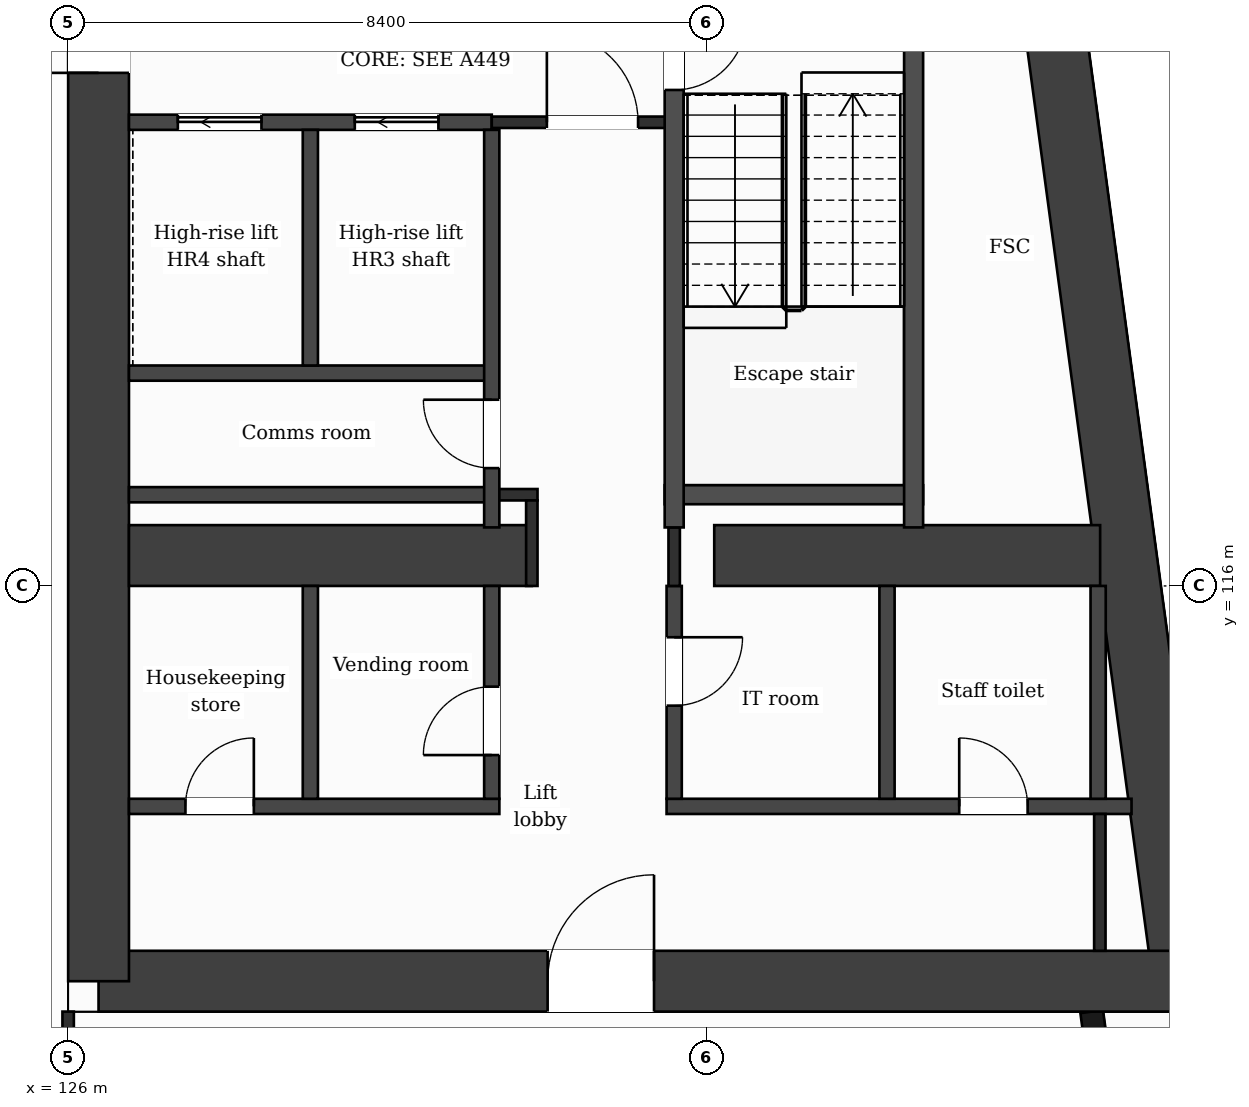
"""IFC4 building model, lengths in metres.
Left out: names, types, materials, properties, quantities, classifications, styles, units other than length and angle.
Written with IfcOpenShell. Run it as: python <this file> out.ifc"""

import sys

from ifc_helpers import new_model, si_unit, direction, frame, frame_2d, origin, place, context, subcontext, project, spatial, rectangle, extrude, element, fill, save


model = new_model("IFC4")
c1 = context("Model", 3, precision=1e-05, world=origin(), true_north=direction((0.0, 1.0)))
c2 = subcontext(c1, "Body", "Model", "MODEL_VIEW")
j1 = project(units=[si_unit("LENGTHUNIT", "METRE"), si_unit("PLANEANGLEUNIT", "RADIAN")], contexts=[c1])
p1 = place(None, origin())
s1 = spatial("IfcSite", under=j1, at=p1, CompositionType="ELEMENT")
p2 = place(p1, origin())
s2 = spatial("IfcBuilding", under=s1, at=p2, CompositionType="ELEMENT")
p3 = place(p2, frame((0.0, 0.0, 202.2)))
s3 = spatial("IfcBuildingStorey", under=s2, at=p3, CompositionType="ELEMENT", Elevation=202.2)
p4 = place(p3, frame((137.82, 132.0, 0.0), z_axis=(0.0, 0.0, 1.0), x_axis=(0.133408347329, -0.991061154956, 0.0)))
e1 = element("IfcWall", 1, at=p4, inside=s3, PredefinedType="SHEAR", context=c2, shape_type="SweptSolid", body=[
    extrude(rectangle(XDim=21.391, YDim=0.8, at=frame_2d((10.696, 0.0))), origin(), (0.0, 0.0, 1.0), 3.7),
])
p5 = place(p3, frame((140.673, 110.8, 0.0), z_axis=(0.0, 0.0, 1.0), x_axis=(-1.0, 0.0, 0.0)))
e2 = element("IfcWall", 2, at=p5, inside=s3, PredefinedType="SHEAR", context=c2, shape_type="SweptSolid", body=[
    extrude(rectangle(XDim=14.273, YDim=0.8, at=frame_2d((7.137, 0.0))), origin(), (0.0, 0.0, 1.0), 3.7),
])
p6 = place(p5, frame((6.965, 0.0, 0.0)))
e3 = element("IfcOpeningElement", 3, at=p6, cuts=e2, PredefinedType="OPENING", context=c2, shape_type="SweptSolid", body=[
    extrude(rectangle(XDim=1.4, YDim=2.1, at=frame_2d((0.7, 1.05))), frame((0.0, 0.41, 0.0), z_axis=(0.0, -1.0, 0.0), x_axis=(1.0, 0.0, 0.0)), (0.0, 0.0, 1.0), 0.82),
])
p7 = place(p3, frame((126.4, 110.8, 0.0), z_axis=(0.0, 0.0, 1.0), x_axis=(0.0, 1.0, 0.0)))
e4 = element("IfcWall", 4, at=p7, inside=s3, PredefinedType="SHEAR", context=c2, shape_type="SweptSolid", body=[
    extrude(rectangle(XDim=21.2, YDim=0.8, at=frame_2d((10.6, 0.0))), origin(), (0.0, 0.0, 1.0), 3.7),
])
p8 = place(p7, frame((11.95, 0.0, 0.0)))
e5 = element("IfcOpeningElement", 5, at=p8, cuts=e4, PredefinedType="OPENING", context=c2, shape_type="SweptSolid", body=[
    extrude(rectangle(XDim=1.4, YDim=2.1, at=frame_2d((0.7, 1.05))), frame((0.0, 0.41, 0.0), z_axis=(0.0, -1.0, 0.0), x_axis=(1.0, 0.0, 0.0)), (0.0, 0.0, 1.0), 0.82),
])
p9 = place(p3, frame((126.8, 116.4, 0.0), z_axis=(0.0, 0.0, 1.0), x_axis=(1.0, 0.0, 0.0)))
e6 = element("IfcWall", 6, at=p9, inside=s3, PredefinedType="SHEAR", context=c2, shape_type="SweptSolid", body=[
    extrude(rectangle(XDim=5.3, YDim=0.8, at=frame_2d((2.65, 0.0))), origin(), (0.0, 0.0, 1.0), 3.7),
])
p10 = place(p3, frame((134.5, 116.4, 0.0), z_axis=(0.0, 0.0, 1.0), x_axis=(1.0, 0.0, 0.0)))
e7 = element("IfcWall", 7, at=p10, inside=s3, PredefinedType="SHEAR", context=c2, shape_type="SweptSolid", body=[
    extrude(rectangle(XDim=5.077, YDim=0.8, at=frame_2d((2.539, 0.0))), origin(), (0.0, 0.0, 1.0), 3.7),
])
p11 = place(p3, frame((140.348, 103.85, 0.0), z_axis=(0.0, 0.0, 1.0), x_axis=(-0.133431549479, 0.991058031401, 0.0)))
e8 = element("IfcWall", 8, at=p11, inside=s3, PredefinedType="SOLIDWALL", context=c2, shape_type="SweptSolid", body=[
    extrude(rectangle(XDim=6.609, YDim=0.3, at=frame_2d((3.304, 0.0))), origin(), (0.0, 0.0, 1.0), 3.38),
])
p12 = place(p11, frame((0.737, 0.0, 0.9)))
e9 = element("IfcOpeningElement", 9, at=p12, cuts=e8, PredefinedType="OPENING", context=c2, shape_type="SweptSolid", body=[
    extrude(rectangle(XDim=1.2, YDim=2.1, at=frame_2d((0.6, 1.05))), frame((0.0, 0.16, 0.0), z_axis=(0.0, -1.0, 0.0), x_axis=(1.0, 0.0, 0.0)), (0.0, 0.0, 1.0), 0.32),
])
p13 = place(p11, frame((3.991, 0.0, 0.0)))
e10 = element("IfcOpeningElement", 10, at=p13, cuts=e8, PredefinedType="OPENING", context=c2, shape_type="SweptSolid", body=[
    extrude(rectangle(XDim=1.2, YDim=2.4, at=frame_2d((0.6, 1.2))), frame((0.0, 0.16, 0.0), z_axis=(0.0, -1.0, 0.0), x_axis=(1.0, 0.0, 0.0)), (0.0, 0.0, 1.0), 0.32),
])
p14 = place(p3, frame((126.8, 113.1, 0.0), z_axis=(0.0, 0.0, 1.0), x_axis=(1.0, 0.0, 0.0)))
e11 = element("IfcWall", 11, at=p14, inside=s3, PredefinedType="PARTITIONING", context=c2, shape_type="SweptSolid", body=[
    extrude(rectangle(XDim=4.873, YDim=0.2, at=frame_2d((2.437, 0.0))), origin(), (0.0, 0.0, 1.0), 3.38),
])
p15 = place(p14, frame((0.743, 0.0, 0.0)))
e12 = element("IfcOpeningElement", 12, at=p15, cuts=e11, PredefinedType="OPENING", context=c2, shape_type="SweptSolid", body=[
    extrude(rectangle(XDim=0.9, YDim=2.1, at=frame_2d((0.45, 1.05))), frame((0.0, 0.11, 0.0), z_axis=(0.0, -1.0, 0.0), x_axis=(1.0, 0.0, 0.0)), (0.0, 0.0, 1.0), 0.22),
])
p16 = place(p3, frame((133.873, 113.1, 0.0), z_axis=(0.0, 0.0, 1.0), x_axis=(1.0, 0.0, 0.0)))
e13 = element("IfcWall", 13, at=p16, inside=s3, PredefinedType="PARTITIONING", context=c2, shape_type="SweptSolid", body=[
    extrude(rectangle(XDim=6.117, YDim=0.2, at=frame_2d((3.059, 0.0))), origin(), (0.0, 0.0, 1.0), 3.38),
])
p17 = place(p16, frame((3.85, 0.0, 0.0)))
e14 = element("IfcOpeningElement", 14, at=p17, cuts=e13, PredefinedType="OPENING", context=c2, shape_type="SweptSolid", body=[
    extrude(rectangle(XDim=0.9, YDim=2.1, at=frame_2d((0.45, 1.05))), frame((0.0, 0.11, 0.0), z_axis=(0.0, -1.0, 0.0), x_axis=(1.0, 0.0, 0.0)), (0.0, 0.0, 1.0), 0.22),
])
p18 = place(p3, frame((126.8, 117.2, 0.0), z_axis=(0.0, 0.0, 1.0), x_axis=(1.0, 0.0, 0.0)))
e15 = element("IfcWall", 15, at=p18, inside=s3, PredefinedType="PARTITIONING", context=c2, shape_type="SweptSolid", body=[
    extrude(rectangle(XDim=4.773, YDim=0.2, at=frame_2d((2.386, 0.0))), origin(), (0.0, 0.0, 1.0), 3.38),
])
p19 = place(p3, frame((131.573, 117.2, 0.0), z_axis=(0.0, 0.0, 1.0), x_axis=(1.0, 0.0, 0.0)))
e16 = element("IfcWall", 16, at=p19, inside=s3, PredefinedType="PARTITIONING", context=c2, shape_type="SweptSolid", body=[
    extrude(rectangle(XDim=0.602, YDim=0.15, at=frame_2d((0.301, 0.0))), origin(), (0.0, 0.0, 1.0), 3.38),
])
p20 = place(p3, frame((133.848, 117.2, 0.0), z_axis=(0.0, 0.0, 1.0), x_axis=(1.0, 0.0, 0.0)))
e17 = element("IfcWall", 17, at=p20, inside=s3, PredefinedType="PARTITIONING", context=c2, shape_type="SweptSolid", body=[
    extrude(rectangle(XDim=3.4, YDim=0.25, at=frame_2d((1.7, 0.0))), origin(), (0.0, 0.0, 1.0), 3.38),
])
p21 = place(p3, frame((126.8, 118.8, 0.0), z_axis=(0.0, 0.0, 1.0), x_axis=(1.0, 0.0, 0.0)))
e18 = element("IfcWall", 18, at=p21, inside=s3, PredefinedType="PARTITIONING", context=c2, shape_type="SweptSolid", body=[
    extrude(rectangle(XDim=4.773, YDim=0.2, at=frame_2d((2.386, 0.0))), origin(), (0.0, 0.0, 1.0), 3.38),
])
p22 = place(p3, frame((126.8, 122.1, 0.0), z_axis=(0.0, 0.0, 1.0), x_axis=(1.0, 0.0, 0.0)))
e19 = element("IfcWall", 19, at=p22, inside=s3, PredefinedType="PARTITIONING", context=c2, shape_type="SweptSolid", body=[
    extrude(rectangle(XDim=4.773, YDim=0.2, at=frame_2d((2.386, 0.0))), origin(), (0.0, 0.0, 1.0), 3.38),
])
p23 = place(p22, frame((2.971, 0.0, 0.0)))
e20 = element("IfcOpeningElement", 20, at=p23, cuts=e19, PredefinedType="OPENING", context=c2, shape_type="SweptSolid", body=[
    extrude(rectangle(XDim=1.1, YDim=2.1, at=frame_2d((0.55, 1.05))), frame((0.0, 0.11, 0.0), z_axis=(0.0, -1.0, 0.0), x_axis=(1.0, 0.0, 0.0)), (0.0, 0.0, 1.0), 0.22),
])
p24 = place(p22, frame((0.643, 0.0, 0.0)))
e21 = element("IfcOpeningElement", 21, at=p24, cuts=e19, PredefinedType="OPENING", context=c2, shape_type="SweptSolid", body=[
    extrude(rectangle(XDim=1.1, YDim=2.1, at=frame_2d((0.55, 1.05))), frame((0.0, 0.11, 0.0), z_axis=(0.0, -1.0, 0.0), x_axis=(1.0, 0.0, 0.0)), (0.0, 0.0, 1.0), 0.22),
])
p25 = place(p3, frame((131.573, 122.1, 0.0), z_axis=(0.0, 0.0, 1.0), x_axis=(1.0, 0.0, 0.0)))
e22 = element("IfcWall", 22, at=p25, inside=s3, PredefinedType="PARTITIONING", context=c2, shape_type="SweptSolid", body=[
    extrude(rectangle(XDim=2.4, YDim=0.15, at=frame_2d((1.2, 0.0))), origin(), (0.0, 0.0, 1.0), 3.38),
])
p26 = place(p25, frame((0.725, 0.0, 0.0)))
e23 = element("IfcOpeningElement", 23, at=p26, cuts=e22, PredefinedType="OPENING", context=c2, shape_type="SweptSolid", body=[
    extrude(rectangle(XDim=1.2, YDim=2.1, at=frame_2d((0.6, 1.05))), frame((0.0, 0.085, 0.0), z_axis=(0.0, -1.0, 0.0), x_axis=(1.0, 0.0, 0.0)), (0.0, 0.0, 1.0), 0.17),
])
p27 = place(p3, frame((126.0, 109.075, 0.0), z_axis=(0.0, 0.0, 1.0), x_axis=(0.0, 1.0, 0.0)))
e24 = element("IfcWall", 24, at=p27, inside=s3, PredefinedType="PARTITIONING", context=c2, shape_type="SweptSolid", body=[
    extrude(rectangle(XDim=1.325, YDim=0.15, at=frame_2d((0.663, 0.0))), origin(), (0.0, 0.0, 1.0), 3.38),
])
p28 = place(p3, frame((129.187, 113.2, 0.0), z_axis=(0.0, 0.0, 1.0), x_axis=(0.0, 1.0, 0.0)))
e25 = element("IfcWall", 25, at=p28, inside=s3, PredefinedType="PARTITIONING", context=c2, shape_type="SweptSolid", body=[
    extrude(rectangle(XDim=2.8, YDim=0.2, at=frame_2d((1.4, 0.0))), origin(), (0.0, 0.0, 1.0), 3.38),
])
p29 = place(p3, frame((129.187, 118.9, 0.0), z_axis=(0.0, 0.0, 1.0), x_axis=(0.0, 1.0, 0.0)))
e26 = element("IfcWall", 26, at=p29, inside=s3, PredefinedType="PARTITIONING", context=c2, shape_type="SweptSolid", body=[
    extrude(rectangle(XDim=3.1, YDim=0.2, at=frame_2d((1.55, 0.0))), origin(), (0.0, 0.0, 1.0), 3.38),
])
p30 = place(p3, frame((131.573, 113.2, 0.0), z_axis=(0.0, 0.0, 1.0), x_axis=(0.0, 1.0, 0.0)))
e27 = element("IfcWall", 27, at=p30, inside=s3, PredefinedType="PARTITIONING", context=c2, shape_type="SweptSolid", body=[
    extrude(rectangle(XDim=2.8, YDim=0.2, at=frame_2d((1.4, 0.0))), origin(), (0.0, 0.0, 1.0), 3.38),
])
p31 = place(p30, frame((0.575, 0.0, 0.0)))
e28 = element("IfcOpeningElement", 28, at=p31, cuts=e27, PredefinedType="OPENING", context=c2, shape_type="SweptSolid", body=[
    extrude(rectangle(XDim=0.9, YDim=2.1, at=frame_2d((0.45, 1.05))), frame((0.0, 0.11, 0.0), z_axis=(0.0, -1.0, 0.0), x_axis=(1.0, 0.0, 0.0)), (0.0, 0.0, 1.0), 0.22),
])
p32 = place(p3, frame((131.573, 116.77, 0.0), z_axis=(0.0, 0.0, 1.0), x_axis=(0.0, 1.0, 0.0)))
e29 = element("IfcWall", 29, at=p32, inside=s3, PredefinedType="PARTITIONING", context=c2, shape_type="SweptSolid", body=[
    extrude(rectangle(XDim=5.23, YDim=0.2, at=frame_2d((2.615, 0.0))), origin(), (0.0, 0.0, 1.0), 3.38),
])
p33 = place(p32, frame((0.78, 0.0, 0.0)))
e30 = element("IfcOpeningElement", 30, at=p33, cuts=e29, PredefinedType="OPENING", context=c2, shape_type="SweptSolid", body=[
    extrude(rectangle(XDim=0.9, YDim=2.1, at=frame_2d((0.45, 1.05))), frame((0.0, 0.11, 0.0), z_axis=(0.0, -1.0, 0.0), x_axis=(1.0, 0.0, 0.0)), (0.0, 0.0, 1.0), 0.22),
])
p34 = place(p3, frame((132.1, 116.0, 0.0), z_axis=(0.0, 0.0, 1.0), x_axis=(0.0, 1.0, 0.0)))
e31 = element("IfcWall", 31, at=p34, inside=s3, PredefinedType="PARTITIONING", context=c2, shape_type="SweptSolid", body=[
    extrude(rectangle(XDim=1.125, YDim=0.15, at=frame_2d((0.562, 0.0))), origin(), (0.0, 0.0, 1.0), 3.38),
])
p35 = place(p3, frame((133.973, 113.2, 0.0), z_axis=(0.0, 0.0, 1.0), x_axis=(0.0, 1.0, 0.0)))
e32 = element("IfcWall", 32, at=p35, inside=s3, PredefinedType="PARTITIONING", context=c2, shape_type="SweptSolid", body=[
    extrude(rectangle(XDim=2.8, YDim=0.2, at=frame_2d((1.4, 0.0))), origin(), (0.0, 0.0, 1.0), 3.38),
])
p36 = place(p35, frame((1.225, 0.0, 0.0)))
e33 = element("IfcOpeningElement", 33, at=p36, cuts=e32, PredefinedType="OPENING", context=c2, shape_type="SweptSolid", body=[
    extrude(rectangle(XDim=0.9, YDim=2.1, at=frame_2d((0.45, 1.05))), frame((0.0, 0.11, 0.0), z_axis=(0.0, -1.0, 0.0), x_axis=(1.0, 0.0, 0.0)), (0.0, 0.0, 1.0), 0.22),
])
p37 = place(p3, frame((133.973, 116.0, 0.0), z_axis=(0.0, 0.0, 1.0), x_axis=(0.0, 1.0, 0.0)))
e34 = element("IfcWall", 34, at=p37, inside=s3, PredefinedType="PARTITIONING", context=c2, shape_type="SweptSolid", body=[
    extrude(rectangle(XDim=0.77, YDim=0.15, at=frame_2d((0.385, 0.0))), origin(), (0.0, 0.0, 1.0), 3.38),
])
p38 = place(p3, frame((133.973, 116.77, 0.0), z_axis=(0.0, 0.0, 1.0), x_axis=(0.0, 1.0, 0.0)))
e35 = element("IfcWall", 35, at=p38, inside=s3, PredefinedType="PARTITIONING", context=c2, shape_type="SweptSolid", body=[
    extrude(rectangle(XDim=7.055, YDim=0.25, at=frame_2d((3.527, 0.0))), origin(), (0.0, 0.0, 1.0), 3.38),
])
p39 = place(p38, frame((5.755, 0.0, 0.0)))
e36 = element("IfcOpeningElement", 36, at=p39, cuts=e35, PredefinedType="OPENING", context=c2, shape_type="SweptSolid", body=[
    extrude(rectangle(XDim=0.95, YDim=2.1, at=frame_2d((0.475, 1.05))), frame((0.0, 0.135, 0.0), z_axis=(0.0, -1.0, 0.0), x_axis=(1.0, 0.0, 0.0)), (0.0, 0.0, 1.0), 0.27),
])
p40 = place(p3, frame((136.773, 113.2, 0.0), z_axis=(0.0, 0.0, 1.0), x_axis=(0.0, 1.0, 0.0)))
e37 = element("IfcWall", 37, at=p40, inside=s3, PredefinedType="PARTITIONING", context=c2, shape_type="SweptSolid", body=[
    extrude(rectangle(XDim=2.8, YDim=0.2, at=frame_2d((1.4, 0.0))), origin(), (0.0, 0.0, 1.0), 3.38),
])
p41 = place(p3, frame((137.123, 116.77, 0.0), z_axis=(0.0, 0.0, 1.0), x_axis=(0.0, 1.0, 0.0)))
e38 = element("IfcWall", 38, at=p41, inside=s3, PredefinedType="PARTITIONING", context=c2, shape_type="SweptSolid", body=[
    extrude(rectangle(XDim=7.055, YDim=0.25, at=frame_2d((3.527, 0.0))), origin(), (0.0, 0.0, 1.0), 3.38),
])
p42 = place(p3, frame((139.551, 113.2, 0.0), z_axis=(0.0, 0.0, 1.0), x_axis=(0.0, 1.0, 0.0)))
e39 = element("IfcWall", 39, at=p42, inside=s3, PredefinedType="PARTITIONING", context=c2, shape_type="SweptSolid", body=[
    extrude(rectangle(XDim=2.8, YDim=0.2, at=frame_2d((1.4, 0.0))), origin(), (0.0, 0.0, 1.0), 3.38),
])
p43 = place(p3, frame((139.573, 111.2, 0.0), z_axis=(0.0, 0.0, 1.0), x_axis=(0.0, 1.0, 0.0)))
e40 = element("IfcWall", 40, at=p43, inside=s3, PredefinedType="PARTITIONING", context=c2, shape_type="SweptSolid", body=[
    extrude(rectangle(XDim=1.8, YDim=0.15, at=frame_2d((0.9, 0.0))), origin(), (0.0, 0.0, 1.0), 3.38),
])
p44 = place(p26, origin())
e41 = element("IfcDoor", 41, at=p44, inside=s3, OperationType="SINGLE_SWING_LEFT", PredefinedType="DOOR", context=c2, shape_type="SweptSolid", body=[
    extrude(rectangle(XDim=1.2, YDim=2.1, at=frame_2d((0.6, 1.05))), frame((0.0, 0.025, 0.0), z_axis=(0.0, -1.0, 0.0), x_axis=(1.0, 0.0, 0.0)), (0.0, 0.0, 1.0), 0.05),
])
fill(e23, e41)
p45 = place(p23, origin())
e42 = element("IfcDoor", 42, at=p45, inside=s3, OperationType="SLIDING_TO_LEFT", PredefinedType="DOOR", context=c2, shape_type="SweptSolid", body=[
    extrude(rectangle(XDim=1.1, YDim=2.1, at=frame_2d((0.55, 1.05))), frame((0.0, 0.025, 0.0), z_axis=(0.0, -1.0, 0.0), x_axis=(1.0, 0.0, 0.0)), (0.0, 0.0, 1.0), 0.05),
])
fill(e20, e42)
p46 = place(p24, origin())
e43 = element("IfcDoor", 43, at=p46, inside=s3, OperationType="SLIDING_TO_LEFT", PredefinedType="DOOR", context=c2, shape_type="SweptSolid", body=[
    extrude(rectangle(XDim=1.1, YDim=2.1, at=frame_2d((0.55, 1.05))), frame((0.0, 0.025, 0.0), z_axis=(0.0, -1.0, 0.0), x_axis=(1.0, 0.0, 0.0)), (0.0, 0.0, 1.0), 0.05),
])
fill(e21, e43)
p47 = place(p39, origin())
e44 = element("IfcDoor", 44, at=p47, inside=s3, OperationType="SINGLE_SWING_RIGHT", PredefinedType="DOOR", context=c2, shape_type="SweptSolid", body=[
    extrude(rectangle(XDim=0.95, YDim=2.1, at=frame_2d((0.475, 1.05))), frame((0.0, 0.025, 0.0), z_axis=(0.0, -1.0, 0.0), x_axis=(1.0, 0.0, 0.0)), (0.0, 0.0, 1.0), 0.05),
])
fill(e36, e44)
p48 = place(p33, origin())
e45 = element("IfcDoor", 45, at=p48, inside=s3, OperationType="SINGLE_SWING_RIGHT", PredefinedType="DOOR", context=c2, shape_type="SweptSolid", body=[
    extrude(rectangle(XDim=0.9, YDim=2.1, at=frame_2d((0.45, 1.05))), frame((0.0, 0.025, 0.0), z_axis=(0.0, -1.0, 0.0), x_axis=(1.0, 0.0, 0.0)), (0.0, 0.0, 1.0), 0.05),
])
fill(e30, e45)
p49 = place(p17, origin())
e46 = element("IfcDoor", 46, at=p49, inside=s3, OperationType="SINGLE_SWING_LEFT", PredefinedType="DOOR", context=c2, shape_type="SweptSolid", body=[
    extrude(rectangle(XDim=0.9, YDim=2.1, at=frame_2d((0.45, 1.05))), frame((0.0, 0.025, 0.0), z_axis=(0.0, -1.0, 0.0), x_axis=(1.0, 0.0, 0.0)), (0.0, 0.0, 1.0), 0.05),
])
fill(e14, e46)
p50 = place(p36, origin())
e47 = element("IfcDoor", 47, at=p50, inside=s3, OperationType="SINGLE_SWING_RIGHT", PredefinedType="DOOR", context=c2, shape_type="SweptSolid", body=[
    extrude(rectangle(XDim=0.9, YDim=2.1, at=frame_2d((0.45, 1.05))), frame((0.0, 0.025, 0.0), z_axis=(0.0, -1.0, 0.0), x_axis=(1.0, 0.0, 0.0)), (0.0, 0.0, 1.0), 0.05),
])
fill(e33, e47)
p51 = place(p31, origin())
e48 = element("IfcDoor", 48, at=p51, inside=s3, OperationType="SINGLE_SWING_LEFT", PredefinedType="DOOR", context=c2, shape_type="SweptSolid", body=[
    extrude(rectangle(XDim=0.9, YDim=2.1, at=frame_2d((0.45, 1.05))), frame((0.0, 0.025, 0.0), z_axis=(0.0, -1.0, 0.0), x_axis=(1.0, 0.0, 0.0)), (0.0, 0.0, 1.0), 0.05),
])
fill(e28, e48)
p52 = place(p15, origin())
e49 = element("IfcDoor", 49, at=p52, inside=s3, OperationType="SINGLE_SWING_RIGHT", PredefinedType="DOOR", context=c2, shape_type="SweptSolid", body=[
    extrude(rectangle(XDim=0.9, YDim=2.1, at=frame_2d((0.45, 1.05))), frame((0.0, 0.025, 0.0), z_axis=(0.0, -1.0, 0.0), x_axis=(1.0, 0.0, 0.0)), (0.0, 0.0, 1.0), 0.05),
])
fill(e12, e49)
p53 = place(p6, origin())
e50 = element("IfcDoor", 50, at=p53, inside=s3, OperationType="SINGLE_SWING_LEFT", PredefinedType="DOOR", context=c2, shape_type="SweptSolid", body=[
    extrude(rectangle(XDim=1.4, YDim=2.1, at=frame_2d((0.7, 1.05))), frame((0.0, 0.025, 0.0), z_axis=(0.0, -1.0, 0.0), x_axis=(1.0, 0.0, 0.0)), (0.0, 0.0, 1.0), 0.05),
])
fill(e3, e50)
p54 = place(p8, origin())
e51 = element("IfcDoor", 51, at=p54, inside=s3, OperationType="SINGLE_SWING_LEFT", PredefinedType="DOOR", context=c2, shape_type="SweptSolid", body=[
    extrude(rectangle(XDim=1.4, YDim=2.1, at=frame_2d((0.7, 1.05))), frame((0.0, 0.025, 0.0), z_axis=(0.0, -1.0, 0.0), x_axis=(1.0, 0.0, 0.0)), (0.0, 0.0, 1.0), 0.05),
])
fill(e5, e51)
save(model, sys.argv[1])
